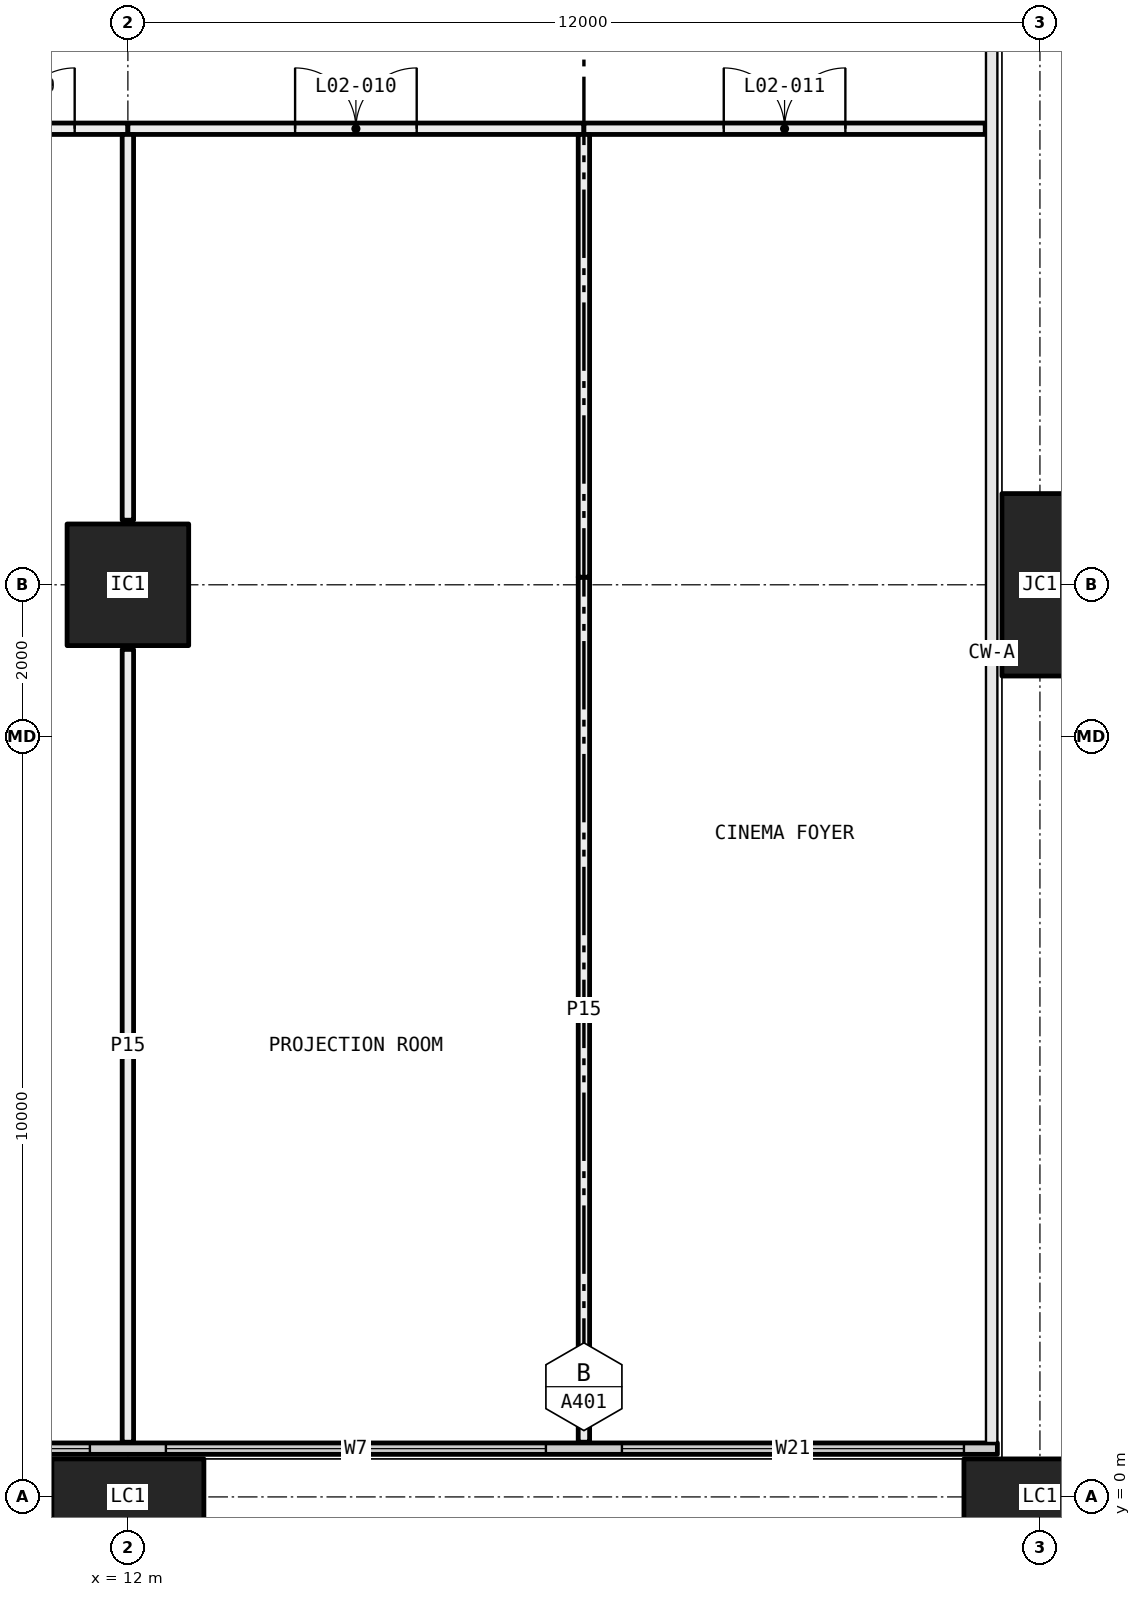
"""IFC4 building model, lengths in metres.
Left out: names, types, materials, properties, quantities, classifications, styles, units other than length and angle.
Written with IfcOpenShell. Run it as: python <this file> out.ifc"""

import sys

from ifc_helpers import new_model, si_unit, direction, frame, frame_2d, origin, origin_2d, place, context, subcontext, project, spatial, rectangle, hollow_rectangle, extrude, element, fill, save


model = new_model("IFC4")
c1 = context("Model", 3, precision=1e-05, world=origin(), true_north=direction((0.0, 1.0)))
c2 = subcontext(c1, "Body", "Model", "MODEL_VIEW")
j1 = project(units=[si_unit("LENGTHUNIT", "METRE"), si_unit("PLANEANGLEUNIT", "RADIAN")], contexts=[c1])
p1 = place(None, origin())
s1 = spatial("IfcSite", under=j1, at=p1, CompositionType="ELEMENT")
p2 = place(p1, origin())
s2 = spatial("IfcBuilding", under=s1, at=p2, CompositionType="ELEMENT")
p3 = place(p2, frame((0.0, 0.0, 12.0)))
s3 = spatial("IfcBuildingStorey", under=s2, at=p3, CompositionType="ELEMENT", Elevation=12.0)
p4 = place(p3, frame((12.0, 0.0, -0.4), z_axis=(0.0, 0.0, 1.0), x_axis=(1.0, 0.0, 0.0)))
e1 = element("IfcColumn", 1, at=p4, inside=s3, PredefinedType="COLUMN", context=c2, shape_type="SweptSolid", body=[
    extrude(hollow_rectangle(XDim=2.0, YDim=1.0, WallThickness=0.08, at=origin_2d()), origin(), (0.0, 0.0, 1.0), 6.0),
])
p5 = place(p3, frame((12.0, 12.0, 0.0), z_axis=(0.0, 0.0, 1.0), x_axis=(1.0, 0.0, 0.0)))
e2 = element("IfcColumn", 2, at=p5, inside=s3, PredefinedType="COLUMN", context=c2, shape_type="SweptSolid", body=[
    extrude(hollow_rectangle(XDim=1.6, YDim=1.6, WallThickness=0.07, at=origin_2d()), origin(), (0.0, 0.0, 1.0), 5.6),
])
p6 = place(p3, frame((24.0, 0.0, -0.4), z_axis=(0.0, 0.0, 1.0), x_axis=(1.0, 0.0, 0.0)))
e3 = element("IfcColumn", 3, at=p6, inside=s3, PredefinedType="COLUMN", context=c2, shape_type="SweptSolid", body=[
    extrude(hollow_rectangle(XDim=2.0, YDim=1.0, WallThickness=0.08, at=origin_2d()), origin(), (0.0, 0.0, 1.0), 6.0),
])
p7 = place(p3, frame((24.0, 12.0, -0.4), z_axis=(0.0, 0.0, 1.0), x_axis=(0.0, 1.0, 0.0)))
e4 = element("IfcColumn", 4, at=p7, inside=s3, PredefinedType="COLUMN", context=c2, shape_type="SweptSolid", body=[
    extrude(hollow_rectangle(XDim=2.4, YDim=1.0, WallThickness=0.09, at=origin_2d()), origin(), (0.0, 0.0, 1.0), 6.0),
])
p8 = place(p3, frame((6.56, 0.635, 0.0), z_axis=(0.0, 0.0, 1.0), x_axis=(1.0, 0.0, 0.0)))
e5 = element("IfcWall", 5, at=p8, inside=s3, PredefinedType="ELEMENTEDWALL", context=c2, shape_type="SweptSolid", body=[
    extrude(rectangle(XDim=16.88, YDim=0.15, at=frame_2d((8.44, 0.0))), origin(), (0.0, 0.0, 1.0), 5.6),
])
p9 = place(p8, frame((0.44, 0.0, 0.45)))
e6 = element("IfcOpeningElement", 6, at=p9, cuts=e5, PredefinedType="OPENING", context=c2, shape_type="SweptSolid", body=[
    extrude(rectangle(XDim=4.5, YDim=5.1, at=frame_2d((2.25, 2.55))), frame((0.0, 0.085, 0.0), z_axis=(0.0, -1.0, 0.0), x_axis=(1.0, 0.0, 0.0)), (0.0, 0.0, 1.0), 0.17),
])
p10 = place(p8, frame((5.94, 0.0, 0.45)))
e7 = element("IfcOpeningElement", 7, at=p10, cuts=e5, PredefinedType="OPENING", context=c2, shape_type="SweptSolid", body=[
    extrude(rectangle(XDim=5.0, YDim=5.1, at=frame_2d((2.5, 2.55))), frame((0.0, 0.085, 0.0), z_axis=(0.0, -1.0, 0.0), x_axis=(1.0, 0.0, 0.0)), (0.0, 0.0, 1.0), 0.17),
])
p11 = place(p8, frame((11.94, 0.0, 0.45)))
e8 = element("IfcOpeningElement", 8, at=p11, cuts=e5, PredefinedType="OPENING", context=c2, shape_type="SweptSolid", body=[
    extrude(rectangle(XDim=4.5, YDim=5.1, at=frame_2d((2.25, 2.55))), frame((0.0, 0.085, 0.0), z_axis=(0.0, -1.0, 0.0), x_axis=(1.0, 0.0, 0.0)), (0.0, 0.0, 1.0), 0.17),
])
p12 = place(p3, frame((9.0, 18.0, 0.0), z_axis=(0.0, 0.0, 1.0), x_axis=(1.0, 0.0, 0.0)))
e9 = element("IfcWall", 9, at=p12, inside=s3, PredefinedType="PARTITIONING", context=c2, shape_type="SweptSolid", body=[
    extrude(rectangle(XDim=3.0, YDim=0.15, at=frame_2d((1.5, 0.0))), origin(), (0.0, 0.0, 1.0), 5.6),
])
p13 = place(p12, frame((0.7, 0.0, 0.0)))
e10 = element("IfcOpeningElement", 10, at=p13, cuts=e9, PredefinedType="OPENING", context=c2, shape_type="SweptSolid", body=[
    extrude(rectangle(XDim=1.6, YDim=2.1, at=frame_2d((0.8, 1.05))), frame((0.0, 0.085, 0.0), z_axis=(0.0, -1.0, 0.0), x_axis=(1.0, 0.0, 0.0)), (0.0, 0.0, 1.0), 0.17),
])
p14 = place(p3, frame((12.0, 18.0, 0.0), z_axis=(0.0, 0.0, 1.0), x_axis=(1.0, 0.0, 0.0)))
e11 = element("IfcWall", 11, at=p14, inside=s3, PredefinedType="PARTITIONING", context=c2, shape_type="SweptSolid", body=[
    extrude(rectangle(XDim=6.0, YDim=0.15, at=frame_2d((3.0, 0.0))), origin(), (0.0, 0.0, 1.0), 5.6),
])
p15 = place(p14, frame((2.2, 0.0, 0.0)))
e12 = element("IfcOpeningElement", 12, at=p15, cuts=e11, PredefinedType="OPENING", context=c2, shape_type="SweptSolid", body=[
    extrude(rectangle(XDim=1.6, YDim=2.1, at=frame_2d((0.8, 1.05))), frame((0.0, 0.085, 0.0), z_axis=(0.0, -1.0, 0.0), x_axis=(1.0, 0.0, 0.0)), (0.0, 0.0, 1.0), 0.17),
])
p16 = place(p3, frame((18.0, 18.0, 0.0), z_axis=(0.0, 0.0, 1.0), x_axis=(1.0, 0.0, 0.0)))
e13 = element("IfcWall", 13, at=p16, inside=s3, PredefinedType="PARTITIONING", context=c2, shape_type="SweptSolid", body=[
    extrude(rectangle(XDim=5.28, YDim=0.15, at=frame_2d((2.64, 0.0))), origin(), (0.0, 0.0, 1.0), 5.6),
])
p17 = place(p16, frame((1.84, 0.0, 0.0)))
e14 = element("IfcOpeningElement", 14, at=p17, cuts=e13, PredefinedType="OPENING", context=c2, shape_type="SweptSolid", body=[
    extrude(rectangle(XDim=1.6, YDim=2.1, at=frame_2d((0.8, 1.05))), frame((0.0, 0.085, 0.0), z_axis=(0.0, -1.0, 0.0), x_axis=(1.0, 0.0, 0.0)), (0.0, 0.0, 1.0), 0.17),
])
p18 = place(p3, frame((12.0, 0.72, 0.0), z_axis=(0.0, 0.0, 1.0), x_axis=(0.0, 1.0, 0.0)))
e15 = element("IfcWall", 15, at=p18, inside=s3, PredefinedType="PARTITIONING", context=c2, shape_type="SweptSolid", body=[
    extrude(rectangle(XDim=10.43, YDim=0.15, at=frame_2d((5.215, 0.0))), origin(), (0.0, 0.0, 1.0), 5.0),
])
p19 = place(p3, frame((12.0, 12.85, 0.0), z_axis=(0.0, 0.0, 1.0), x_axis=(0.0, 1.0, 0.0)))
e16 = element("IfcWall", 16, at=p19, inside=s3, PredefinedType="PARTITIONING", context=c2, shape_type="SweptSolid", body=[
    extrude(rectangle(XDim=5.075, YDim=0.15, at=frame_2d((2.538, 0.0))), origin(), (0.0, 0.0, 1.0), 5.6),
])
p20 = place(p3, frame((18.0, 0.72, 0.0), z_axis=(0.0, 0.0, 1.0), x_axis=(0.0, 1.0, 0.0)))
e17 = element("IfcWall", 17, at=p20, inside=s3, PredefinedType="PARTITIONING", context=c2, shape_type="SweptSolid", body=[
    extrude(rectangle(XDim=11.38, YDim=0.15, at=frame_2d((5.69, 0.0))), origin(), (0.0, 0.0, 1.0), 5.0),
])
p21 = place(p3, frame((18.0, 12.1, 0.0), z_axis=(0.0, 0.0, 1.0), x_axis=(0.0, 1.0, 0.0)))
e18 = element("IfcWall", 18, at=p21, inside=s3, PredefinedType="PARTITIONING", context=c2, shape_type="SweptSolid", body=[
    extrude(rectangle(XDim=5.825, YDim=0.15, at=frame_2d((2.913, 0.0))), origin(), (0.0, 0.0, 1.0), 5.6),
])
p22 = place(p9, origin())
e19 = element("IfcWindow", 19, at=p22, inside=s3, PartitioningType="SINGLE_PANEL", PredefinedType="WINDOW", context=c2, shape_type="SweptSolid", body=[
    extrude(rectangle(XDim=4.5, YDim=5.1, at=frame_2d((2.25, 2.55))), frame((0.0, 0.03, 0.0), z_axis=(0.0, -1.0, 0.0), x_axis=(1.0, 0.0, 0.0)), (0.0, 0.0, 1.0), 0.06),
])
fill(e6, e19)
p23 = place(p10, origin())
e20 = element("IfcWindow", 20, at=p23, inside=s3, PartitioningType="SINGLE_PANEL", PredefinedType="WINDOW", context=c2, shape_type="SweptSolid", body=[
    extrude(rectangle(XDim=5.0, YDim=5.1, at=frame_2d((2.5, 2.55))), frame((0.0, 0.03, 0.0), z_axis=(0.0, -1.0, 0.0), x_axis=(1.0, 0.0, 0.0)), (0.0, 0.0, 1.0), 0.06),
])
fill(e7, e20)
p24 = place(p11, origin())
e21 = element("IfcWindow", 21, at=p24, inside=s3, PartitioningType="SINGLE_PANEL", PredefinedType="WINDOW", context=c2, shape_type="SweptSolid", body=[
    extrude(rectangle(XDim=4.5, YDim=5.1, at=frame_2d((2.25, 2.55))), frame((0.0, 0.03, 0.0), z_axis=(0.0, -1.0, 0.0), x_axis=(1.0, 0.0, 0.0)), (0.0, 0.0, 1.0), 0.06),
])
fill(e8, e21)
p25 = place(p13, origin())
e22 = element("IfcDoor", 22, at=p25, inside=s3, OperationType="DOUBLE_DOOR_SINGLE_SWING", PredefinedType="DOOR", context=c2, shape_type="SweptSolid", body=[
    extrude(rectangle(XDim=1.6, YDim=2.1, at=frame_2d((0.8, 1.05))), frame((0.0, 0.025, 0.0), z_axis=(0.0, -1.0, 0.0), x_axis=(1.0, 0.0, 0.0)), (0.0, 0.0, 1.0), 0.05),
])
fill(e10, e22)
p26 = place(p15, origin())
e23 = element("IfcDoor", 23, at=p26, inside=s3, OperationType="DOUBLE_DOOR_SINGLE_SWING", PredefinedType="DOOR", context=c2, shape_type="SweptSolid", body=[
    extrude(rectangle(XDim=1.6, YDim=2.1, at=frame_2d((0.8, 1.05))), frame((0.0, 0.025, 0.0), z_axis=(0.0, -1.0, 0.0), x_axis=(1.0, 0.0, 0.0)), (0.0, 0.0, 1.0), 0.05),
])
fill(e12, e23)
p27 = place(p17, origin())
e24 = element("IfcDoor", 24, at=p27, inside=s3, OperationType="DOUBLE_DOOR_SINGLE_SWING", PredefinedType="DOOR", context=c2, shape_type="SweptSolid", body=[
    extrude(rectangle(XDim=1.6, YDim=2.1, at=frame_2d((0.8, 1.05))), frame((0.0, 0.025, 0.0), z_axis=(0.0, -1.0, 0.0), x_axis=(1.0, 0.0, 0.0)), (0.0, 0.0, 1.0), 0.05),
])
fill(e14, e24)
save(model, sys.argv[1])
